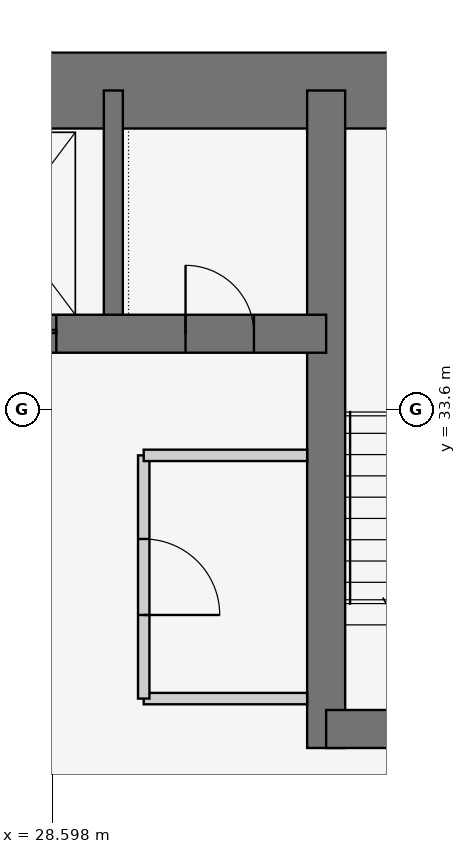
"""IFC4 building model, lengths in metres.
Left out: names, types, materials, properties, quantities, classifications, styles, units other than length and angle.
Written with IfcOpenShell. Run it as: python <this file> out.ifc"""

import sys

from ifc_helpers import new_model, si_unit, direction, frame, frame_2d, origin, place, context, subcontext, project, spatial, rectangle, extrude, element, fill, save


model = new_model("IFC4")
c1 = context("Model", 3, precision=1e-05, world=origin(), true_north=direction((0.0, 1.0)))
c2 = subcontext(c1, "Body", "Model", "MODEL_VIEW")
j1 = project(units=[si_unit("LENGTHUNIT", "METRE"), si_unit("PLANEANGLEUNIT", "RADIAN")], contexts=[c1])
p1 = place(None, origin())
s1 = spatial("IfcSite", under=j1, at=p1, CompositionType="ELEMENT")
p2 = place(p1, origin())
s2 = spatial("IfcBuilding", under=s1, at=p2, CompositionType="ELEMENT")
p3 = place(p2, frame((0.0, 0.0, 70.5)))
s3 = spatial("IfcBuildingStorey", under=s2, at=p3, CompositionType="ELEMENT", Elevation=70.5)
p4 = place(p3, frame((37.8, 37.8, 0.0), z_axis=(0.0, 0.0, 1.0), x_axis=(-1.0, 0.0, 0.0)))
e1 = element("IfcWall", 1, at=p4, inside=s3, PredefinedType="SHEAR", context=c2, shape_type="SweptSolid", body=[
    extrude(rectangle(XDim=17.3, YDim=1.0, at=frame_2d((8.65, 0.0))), origin(), (0.0, 0.0, 1.0), 3.6),
])
p5 = place(p3, frame((21.0, 34.6, 0.0), z_axis=(0.0, 0.0, 1.0), x_axis=(1.0, 0.0, 0.0)))
e2 = element("IfcWall", 2, at=p5, inside=s3, PredefinedType="SHEAR", context=c2, shape_type="SweptSolid", body=[
    extrude(rectangle(XDim=11.2, YDim=0.5, at=frame_2d((5.6, 0.0))), origin(), (0.0, 0.0, 1.0), 3.6),
])
p6 = place(p5, frame((9.35, 0.0, 0.0)))
e3 = element("IfcOpeningElement", 3, at=p6, cuts=e2, PredefinedType="OPENING", context=c2, shape_type="SweptSolid", body=[
    extrude(rectangle(XDim=0.9, YDim=2.1, at=frame_2d((0.45, 1.05))), frame((0.0, 0.26, 0.0), z_axis=(0.0, -1.0, 0.0), x_axis=(1.0, 0.0, 0.0)), (0.0, 0.0, 1.0), 0.52),
])
p7 = place(p5, frame((1.0, 0.0, 0.0)))
e4 = element("IfcOpeningElement", 4, at=p7, cuts=e2, PredefinedType="OPENING", context=c2, shape_type="SweptSolid", body=[
    extrude(rectangle(XDim=1.1, YDim=2.1, at=frame_2d((0.55, 1.05))), frame((0.0, 0.26, 0.0), z_axis=(0.0, -1.0, 0.0), x_axis=(1.0, 0.0, 0.0)), (0.0, 0.0, 1.0), 0.52),
])
p8 = place(p5, frame((3.65, 0.0, 0.0)))
e5 = element("IfcOpeningElement", 5, at=p8, cuts=e2, PredefinedType="OPENING", context=c2, shape_type="SweptSolid", body=[
    extrude(rectangle(XDim=1.1, YDim=2.1, at=frame_2d((0.55, 1.05))), frame((0.0, 0.26, 0.0), z_axis=(0.0, -1.0, 0.0), x_axis=(1.0, 0.0, 0.0)), (0.0, 0.0, 1.0), 0.52),
])
p9 = place(p5, frame((6.35, 0.0, 0.0)))
e6 = element("IfcOpeningElement", 6, at=p9, cuts=e2, PredefinedType="OPENING", context=c2, shape_type="SweptSolid", body=[
    extrude(rectangle(XDim=1.3, YDim=2.1, at=frame_2d((0.65, 1.05))), frame((0.0, 0.26, 0.0), z_axis=(0.0, -1.0, 0.0), x_axis=(1.0, 0.0, 0.0)), (0.0, 0.0, 1.0), 0.52),
])
p10 = place(p3, frame((32.2, 29.15, 0.0), z_axis=(0.0, 0.0, 1.0), x_axis=(0.0, 1.0, 0.0)))
e7 = element("IfcWall", 7, at=p10, inside=s3, PredefinedType="SHEAR", context=c2, shape_type="SweptSolid", body=[
    extrude(rectangle(XDim=8.65, YDim=0.5, at=frame_2d((4.325, 0.0))), origin(), (0.0, 0.0, 1.0), 3.6),
])
p11 = place(p3, frame((32.2, 29.4, 0.0), z_axis=(0.0, 0.0, 1.0), x_axis=(1.0, 0.0, 0.0)))
e8 = element("IfcWall", 8, at=p11, inside=s3, PredefinedType="SHEAR", context=c2, shape_type="SweptSolid", body=[
    extrude(rectangle(XDim=5.6, YDim=0.5, at=frame_2d((2.8, 0.0))), origin(), (0.0, 0.0, 1.0), 3.6),
])
p12 = place(p11, frame((2.0, 0.0, 0.0)))
e9 = element("IfcOpeningElement", 9, at=p12, cuts=e8, PredefinedType="OPENING", context=c2, shape_type="SweptSolid", body=[
    extrude(rectangle(XDim=1.2, YDim=2.1, at=frame_2d((0.6, 1.05))), frame((0.0, 0.26, 0.0), z_axis=(0.0, -1.0, 0.0), x_axis=(1.0, 0.0, 0.0)), (0.0, 0.0, 1.0), 0.52),
])
p13 = place(p3, frame((29.4, 34.6, 0.0), z_axis=(0.0, 0.0, 1.0), x_axis=(0.0, 1.0, 0.0)))
e10 = element("IfcWall", 10, at=p13, inside=s3, PredefinedType="SHEAR", context=c2, shape_type="SweptSolid", body=[
    extrude(rectangle(XDim=3.2, YDim=0.25, at=frame_2d((1.6, 0.0))), origin(), (0.0, 0.0, 1.0), 3.6),
])
p14 = place(p3, frame((31.95, 29.8, 0.0), z_axis=(0.0, 0.0, 1.0), x_axis=(-1.0, 0.0, 0.0)))
e11 = element("IfcWall", 11, at=p14, inside=s3, PredefinedType="PARTITIONING", context=c2, shape_type="SweptSolid", body=[
    extrude(rectangle(XDim=2.15, YDim=0.15, at=frame_2d((1.075, 0.0))), origin(), (0.0, 0.0, 1.0), 3.45),
])
p15 = place(p3, frame((29.8, 29.8, 0.0), z_axis=(0.0, 0.0, 1.0), x_axis=(0.0, 1.0, 0.0)))
e12 = element("IfcWall", 12, at=p15, inside=s3, PredefinedType="PARTITIONING", context=c2, shape_type="SweptSolid", body=[
    extrude(rectangle(XDim=3.2, YDim=0.15, at=frame_2d((1.6, 0.0))), origin(), (0.0, 0.0, 1.0), 3.45),
])
p16 = place(p15, frame((1.1, 0.0, 0.0)))
e13 = element("IfcOpeningElement", 13, at=p16, cuts=e12, PredefinedType="OPENING", context=c2, shape_type="SweptSolid", body=[
    extrude(rectangle(XDim=1.0, YDim=2.1, at=frame_2d((0.5, 1.05))), frame((0.0, 0.085, 0.0), z_axis=(0.0, -1.0, 0.0), x_axis=(1.0, 0.0, 0.0)), (0.0, 0.0, 1.0), 0.17),
])
p17 = place(p3, frame((29.8, 33.0, 0.0), z_axis=(0.0, 0.0, 1.0), x_axis=(1.0, 0.0, 0.0)))
e14 = element("IfcWall", 14, at=p17, inside=s3, PredefinedType="PARTITIONING", context=c2, shape_type="SweptSolid", body=[
    extrude(rectangle(XDim=2.15, YDim=0.15, at=frame_2d((1.075, 0.0))), origin(), (0.0, 0.0, 1.0), 3.45),
])
p18 = place(p6, origin())
e15 = element("IfcDoor", 15, at=p18, inside=s3, OperationType="SINGLE_SWING_LEFT", PredefinedType="DOOR", context=c2, shape_type="SweptSolid", body=[
    extrude(rectangle(XDim=0.9, YDim=2.1, at=frame_2d((0.45, 1.05))), frame((0.0, 0.025, 0.0), z_axis=(0.0, -1.0, 0.0), x_axis=(1.0, 0.0, 0.0)), (0.0, 0.0, 1.0), 0.05),
])
fill(e3, e15)
p19 = place(p16, frame((1.0, 0.0, 0.0), z_axis=(0.0, 0.0, 1.0), x_axis=(-1.0, 0.0, 0.0)))
e16 = element("IfcDoor", 16, at=p19, inside=s3, OperationType="SINGLE_SWING_RIGHT", PredefinedType="DOOR", context=c2, shape_type="SweptSolid", body=[
    extrude(rectangle(XDim=1.0, YDim=2.1, at=frame_2d((0.5, 1.05))), frame((0.0, 0.025, 0.0), z_axis=(0.0, -1.0, 0.0), x_axis=(1.0, 0.0, 0.0)), (0.0, 0.0, 1.0), 0.05),
])
fill(e13, e16)
p20 = place(p9, origin())
e17 = element("IfcDoor", 17, at=p20, inside=s3, OperationType="DOUBLE_DOOR_SLIDING", PredefinedType="DOOR", context=c2, shape_type="SweptSolid", body=[
    extrude(rectangle(XDim=1.3, YDim=2.1, at=frame_2d((0.65, 1.05))), frame((0.0, 0.025, 0.0), z_axis=(0.0, -1.0, 0.0), x_axis=(1.0, 0.0, 0.0)), (0.0, 0.0, 1.0), 0.05),
])
fill(e6, e17)
save(model, sys.argv[1])
